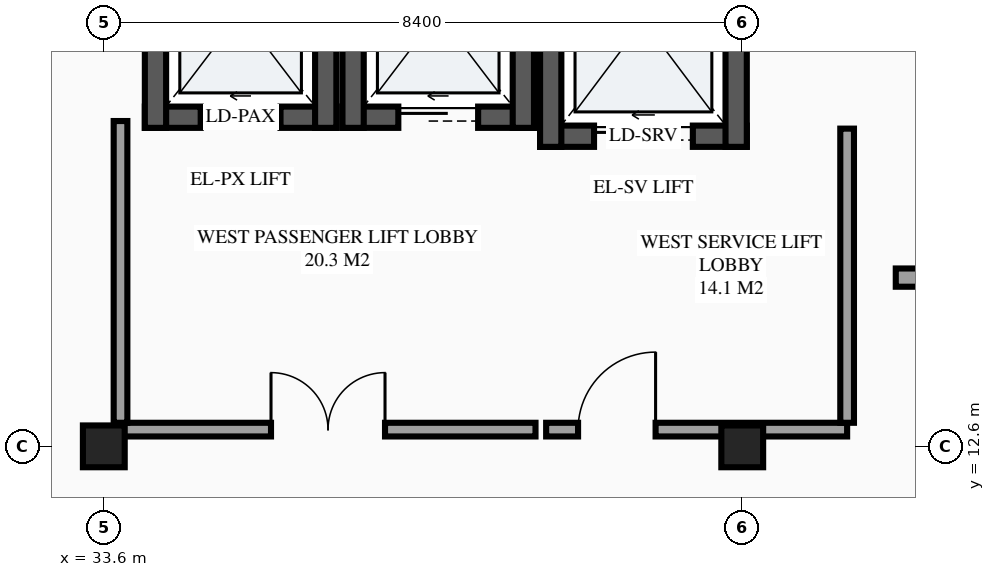
"""IFC4 building model, lengths in metres.
Left out: names, types, materials, properties, quantities, classifications, styles, units other than length and angle.
Written with IfcOpenShell. Run it as: python <this file> out.ifc"""

import sys

from ifc_helpers import new_model, si_unit, direction, frame, frame_2d, origin, origin_2d, place, context, subcontext, project, spatial, rectangle, extrude, element, fill, save


model = new_model("IFC4")
c1 = context("Model", 3, precision=1e-05, world=origin(), true_north=direction((0.0, 1.0)))
c2 = subcontext(c1, "Body", "Model", "MODEL_VIEW")
j1 = project(units=[si_unit("LENGTHUNIT", "METRE"), si_unit("PLANEANGLEUNIT", "RADIAN")], contexts=[c1])
p1 = place(None, origin())
s1 = spatial("IfcSite", under=j1, at=p1, CompositionType="ELEMENT")
p2 = place(p1, origin())
s2 = spatial("IfcBuilding", under=s1, at=p2, CompositionType="ELEMENT")
p3 = place(p2, frame((0.0, 0.0, 32.7)))
s3 = spatial("IfcBuildingStorey", under=s2, at=p3, CompositionType="ELEMENT", Elevation=32.7)
for number, where, z_axis, x_axis in (
    (1, (33.6, 12.6, 0.0), (0.0, 0.0, 1.0), (1.0, 0.0, 0.0)),
    (2, (42.0, 12.6, 0.0), (0.0, 0.0, 1.0), (1.0, 0.0, 0.0)),
):
    element("IfcColumn", number, at=place(p3, frame(where, z_axis=z_axis, x_axis=x_axis)), inside=s3, PredefinedType="COLUMN", context=c2, shape_type="SweptSolid", body=[
        extrude(rectangle(XDim=0.55, YDim=0.55, at=origin_2d()), origin(), (0.0, 0.0, 1.0), 3.6),
    ])
p4 = place(p3, frame((34.14, 16.93, 0.0), z_axis=(0.0, 0.0, 1.0), x_axis=(1.0, 0.0, 0.0)))
e3 = element("IfcWall", 3, at=p4, inside=s3, PredefinedType="SHEAR", context=c2, shape_type="SweptSolid", body=[
    extrude(rectangle(XDim=2.52, YDim=0.28, at=frame_2d((1.26, 0.0))), origin(), (0.0, 0.0, 1.0), 3.6),
])
p5 = place(p4, frame((0.735, 0.0, 0.0)))
e4 = element("IfcOpeningElement", 4, at=p5, cuts=e3, PredefinedType="OPENING", context=c2, shape_type="SweptSolid", body=[
    extrude(rectangle(XDim=1.05, YDim=2.2, at=frame_2d((0.525, 1.1))), frame((0.0, 0.15, 0.0), z_axis=(0.0, -1.0, 0.0), x_axis=(1.0, 0.0, 0.0)), (0.0, 0.0, 1.0), 0.3),
])
for number, where, z_axis, x_axis in (
    (5, (36.52, 16.79, 0.0), (0.0, 0.0, 1.0), (0.0, 1.0, 0.0)),
    (6, (34.28, 19.81, 0.0), (0.0, 0.0, 1.0), (0.0, -1.0, 0.0)),
):
    element("IfcWall", number, at=place(p3, frame(where, z_axis=z_axis, x_axis=x_axis)), inside=s3, PredefinedType="SHEAR", context=c2, shape_type="SweptSolid", body=[
        extrude(rectangle(XDim=3.02, YDim=0.28, at=frame_2d((1.51, 0.0))), origin(), (0.0, 0.0, 1.0), 3.6),
    ])
p6 = place(p3, frame((36.74, 16.93, 0.0), z_axis=(0.0, 0.0, 1.0), x_axis=(1.0, 0.0, 0.0)))
e7 = element("IfcWall", 7, at=p6, inside=s3, PredefinedType="SHEAR", context=c2, shape_type="SweptSolid", body=[
    extrude(rectangle(XDim=2.52, YDim=0.28, at=frame_2d((1.26, 0.0))), origin(), (0.0, 0.0, 1.0), 3.6),
])
p7 = place(p6, frame((0.735, 0.0, 0.0)))
e8 = element("IfcOpeningElement", 8, at=p7, cuts=e7, PredefinedType="OPENING", context=c2, shape_type="SweptSolid", body=[
    extrude(rectangle(XDim=1.05, YDim=2.2, at=frame_2d((0.525, 1.1))), frame((0.0, 0.15, 0.0), z_axis=(0.0, -1.0, 0.0), x_axis=(1.0, 0.0, 0.0)), (0.0, 0.0, 1.0), 0.3),
])
for number, where, z_axis, x_axis in (
    (9, (39.12, 16.79, 0.0), (0.0, 0.0, 1.0), (0.0, 1.0, 0.0)),
    (10, (36.88, 19.81, 0.0), (0.0, 0.0, 1.0), (0.0, -1.0, 0.0)),
):
    element("IfcWall", number, at=place(p3, frame(where, z_axis=z_axis, x_axis=x_axis)), inside=s3, PredefinedType="SHEAR", context=c2, shape_type="SweptSolid", body=[
        extrude(rectangle(XDim=3.02, YDim=0.28, at=frame_2d((1.51, 0.0))), origin(), (0.0, 0.0, 1.0), 3.6),
    ])
p8 = place(p3, frame((39.34, 16.68, 0.0), z_axis=(0.0, 0.0, 1.0), x_axis=(1.0, 0.0, 0.0)))
e11 = element("IfcWall", 11, at=p8, inside=s3, PredefinedType="SHEAR", context=c2, shape_type="SweptSolid", body=[
    extrude(rectangle(XDim=2.72, YDim=0.28, at=frame_2d((1.36, 0.0))), origin(), (0.0, 0.0, 1.0), 3.6),
])
p9 = place(p8, frame((0.71, 0.0, 0.0)))
e12 = element("IfcOpeningElement", 12, at=p9, cuts=e11, PredefinedType="OPENING", context=c2, shape_type="SweptSolid", body=[
    extrude(rectangle(XDim=1.3, YDim=2.25, at=frame_2d((0.65, 1.125))), frame((0.0, 0.15, 0.0), z_axis=(0.0, -1.0, 0.0), x_axis=(1.0, 0.0, 0.0)), (0.0, 0.0, 1.0), 0.3),
])
for number, where, z_axis, x_axis in (
    (13, (41.92, 16.54, 0.0), (0.0, 0.0, 1.0), (0.0, 1.0, 0.0)),
    (14, (39.48, 19.86, 0.0), (0.0, 0.0, 1.0), (0.0, -1.0, 0.0)),
):
    element("IfcWall", number, at=place(p3, frame(where, z_axis=z_axis, x_axis=x_axis)), inside=s3, PredefinedType="SHEAR", context=c2, shape_type="SweptSolid", body=[
        extrude(rectangle(XDim=3.32, YDim=0.28, at=frame_2d((1.66, 0.0))), origin(), (0.0, 0.0, 1.0), 3.6),
    ])
p10 = place(p3, frame((33.82, 12.82, 0.0), z_axis=(0.0, 0.0, 1.0), x_axis=(1.0, 0.0, 0.0)))
e15 = element("IfcWall", 15, at=p10, inside=s3, PredefinedType="PARTITIONING", context=c2, shape_type="SweptSolid", body=[
    extrude(rectangle(XDim=5.46, YDim=0.18, at=frame_2d((2.73, 0.0))), origin(), (0.0, 0.0, 1.0), 2.53),
])
p11 = place(p10, frame((1.98, 0.0, 0.0)))
e16 = element("IfcOpeningElement", 16, at=p11, cuts=e15, PredefinedType="OPENING", context=c2, shape_type="SweptSolid", body=[
    extrude(rectangle(XDim=1.5, YDim=2.15, at=frame_2d((0.75, 1.075))), frame((0.0, 0.1, 0.0), z_axis=(0.0, -1.0, 0.0), x_axis=(1.0, 0.0, 0.0)), (0.0, 0.0, 1.0), 0.2),
])
p12 = place(p3, frame((33.82, 12.91, 0.0), z_axis=(0.0, 0.0, 1.0), x_axis=(0.0, 1.0, 0.0)))
e17 = element("IfcWall", 17, at=p12, inside=s3, PredefinedType="PARTITIONING", context=c2, shape_type="SweptSolid", body=[
    extrude(rectangle(XDim=3.97, YDim=0.18, at=frame_2d((1.985, 0.0))), origin(), (0.0, 0.0, 1.0), 3.375),
])
p13 = place(p3, frame((39.42, 12.82, 0.0), z_axis=(0.0, 0.0, 1.0), x_axis=(1.0, 0.0, 0.0)))
e18 = element("IfcWall", 18, at=p13, inside=s3, PredefinedType="PARTITIONING", context=c2, shape_type="SweptSolid", body=[
    extrude(rectangle(XDim=3.96, YDim=0.18, at=frame_2d((1.98, 0.0))), origin(), (0.0, 0.0, 1.0), 2.48),
])
p14 = place(p13, frame((0.42, 0.0, 0.0)))
e19 = element("IfcOpeningElement", 19, at=p14, cuts=e18, PredefinedType="OPENING", context=c2, shape_type="SweptSolid", body=[
    extrude(rectangle(XDim=1.02, YDim=2.15, at=frame_2d((0.51, 1.075))), frame((0.0, 0.1, 0.0), z_axis=(0.0, -1.0, 0.0), x_axis=(1.0, 0.0, 0.0)), (0.0, 0.0, 1.0), 0.2),
])
p15 = place(p3, frame((43.38, 12.91, 0.0), z_axis=(0.0, 0.0, 1.0), x_axis=(0.0, 1.0, 0.0)))
e20 = element("IfcWall", 20, at=p15, inside=s3, PredefinedType="PARTITIONING", context=c2, shape_type="SweptSolid", body=[
    extrude(rectangle(XDim=3.87, YDim=0.18, at=frame_2d((1.935, 0.0))), origin(), (0.0, 0.0, 1.0), 3.375),
])
p16 = place(p3, frame((44.02, 14.82, 0.0), z_axis=(0.0, 0.0, 1.0), x_axis=(1.0, 0.0, 0.0)))
e21 = element("IfcWall", 21, at=p16, inside=s3, PredefinedType="PARTITIONING", context=c2, shape_type="SweptSolid", body=[
    extrude(rectangle(XDim=5.96, YDim=0.24, at=frame_2d((2.98, 0.0))), origin(), (0.0, 0.0, 1.0), 3.375),
])
p17 = place(p16, frame((2.13, 0.0, 0.0)))
e22 = element("IfcOpeningElement", 22, at=p17, cuts=e21, PredefinedType="OPENING", context=c2, shape_type="SweptSolid", body=[
    extrude(rectangle(XDim=1.7, YDim=2.2, at=frame_2d((0.85, 1.1))), frame((0.0, 0.13, 0.0), z_axis=(0.0, -1.0, 0.0), x_axis=(1.0, 0.0, 0.0)), (0.0, 0.0, 1.0), 0.26),
])
p18 = place(p5, origin())
e23 = element("IfcDoor", 23, at=p18, inside=s3, OperationType="SLIDING_TO_LEFT", PredefinedType="DOOR", context=c2, shape_type="SweptSolid", body=[
    extrude(rectangle(XDim=1.05, YDim=2.2, at=frame_2d((0.525, 1.1))), frame((0.0, 0.025, 0.0), z_axis=(0.0, -1.0, 0.0), x_axis=(1.0, 0.0, 0.0)), (0.0, 0.0, 1.0), 0.05),
])
fill(e4, e23)
p19 = place(p7, origin())
e24 = element("IfcDoor", 24, at=p19, inside=s3, OperationType="SLIDING_TO_LEFT", PredefinedType="DOOR", context=c2, shape_type="SweptSolid", body=[
    extrude(rectangle(XDim=1.05, YDim=2.2, at=frame_2d((0.525, 1.1))), frame((0.0, 0.025, 0.0), z_axis=(0.0, -1.0, 0.0), x_axis=(1.0, 0.0, 0.0)), (0.0, 0.0, 1.0), 0.05),
])
fill(e8, e24)
p20 = place(p9, origin())
e25 = element("IfcDoor", 25, at=p20, inside=s3, OperationType="SLIDING_TO_LEFT", PredefinedType="DOOR", context=c2, shape_type="SweptSolid", body=[
    extrude(rectangle(XDim=1.3, YDim=2.25, at=frame_2d((0.65, 1.125))), frame((0.0, 0.025, 0.0), z_axis=(0.0, -1.0, 0.0), x_axis=(1.0, 0.0, 0.0)), (0.0, 0.0, 1.0), 0.05),
])
fill(e12, e25)
p21 = place(p11, origin())
e26 = element("IfcDoor", 26, at=p21, inside=s3, OperationType="DOUBLE_DOOR_SINGLE_SWING", PredefinedType="DOOR", context=c2, shape_type="SweptSolid", body=[
    extrude(rectangle(XDim=1.5, YDim=2.15, at=frame_2d((0.75, 1.075))), frame((0.0, 0.025, 0.0), z_axis=(0.0, -1.0, 0.0), x_axis=(1.0, 0.0, 0.0)), (0.0, 0.0, 1.0), 0.05),
])
fill(e16, e26)
p22 = place(p14, origin())
e27 = element("IfcDoor", 27, at=p22, inside=s3, OperationType="SINGLE_SWING_RIGHT", PredefinedType="DOOR", context=c2, shape_type="SweptSolid", body=[
    extrude(rectangle(XDim=1.02, YDim=2.15, at=frame_2d((0.51, 1.075))), frame((0.0, 0.025, 0.0), z_axis=(0.0, -1.0, 0.0), x_axis=(1.0, 0.0, 0.0)), (0.0, 0.0, 1.0), 0.05),
])
fill(e19, e27)
save(model, sys.argv[1])
